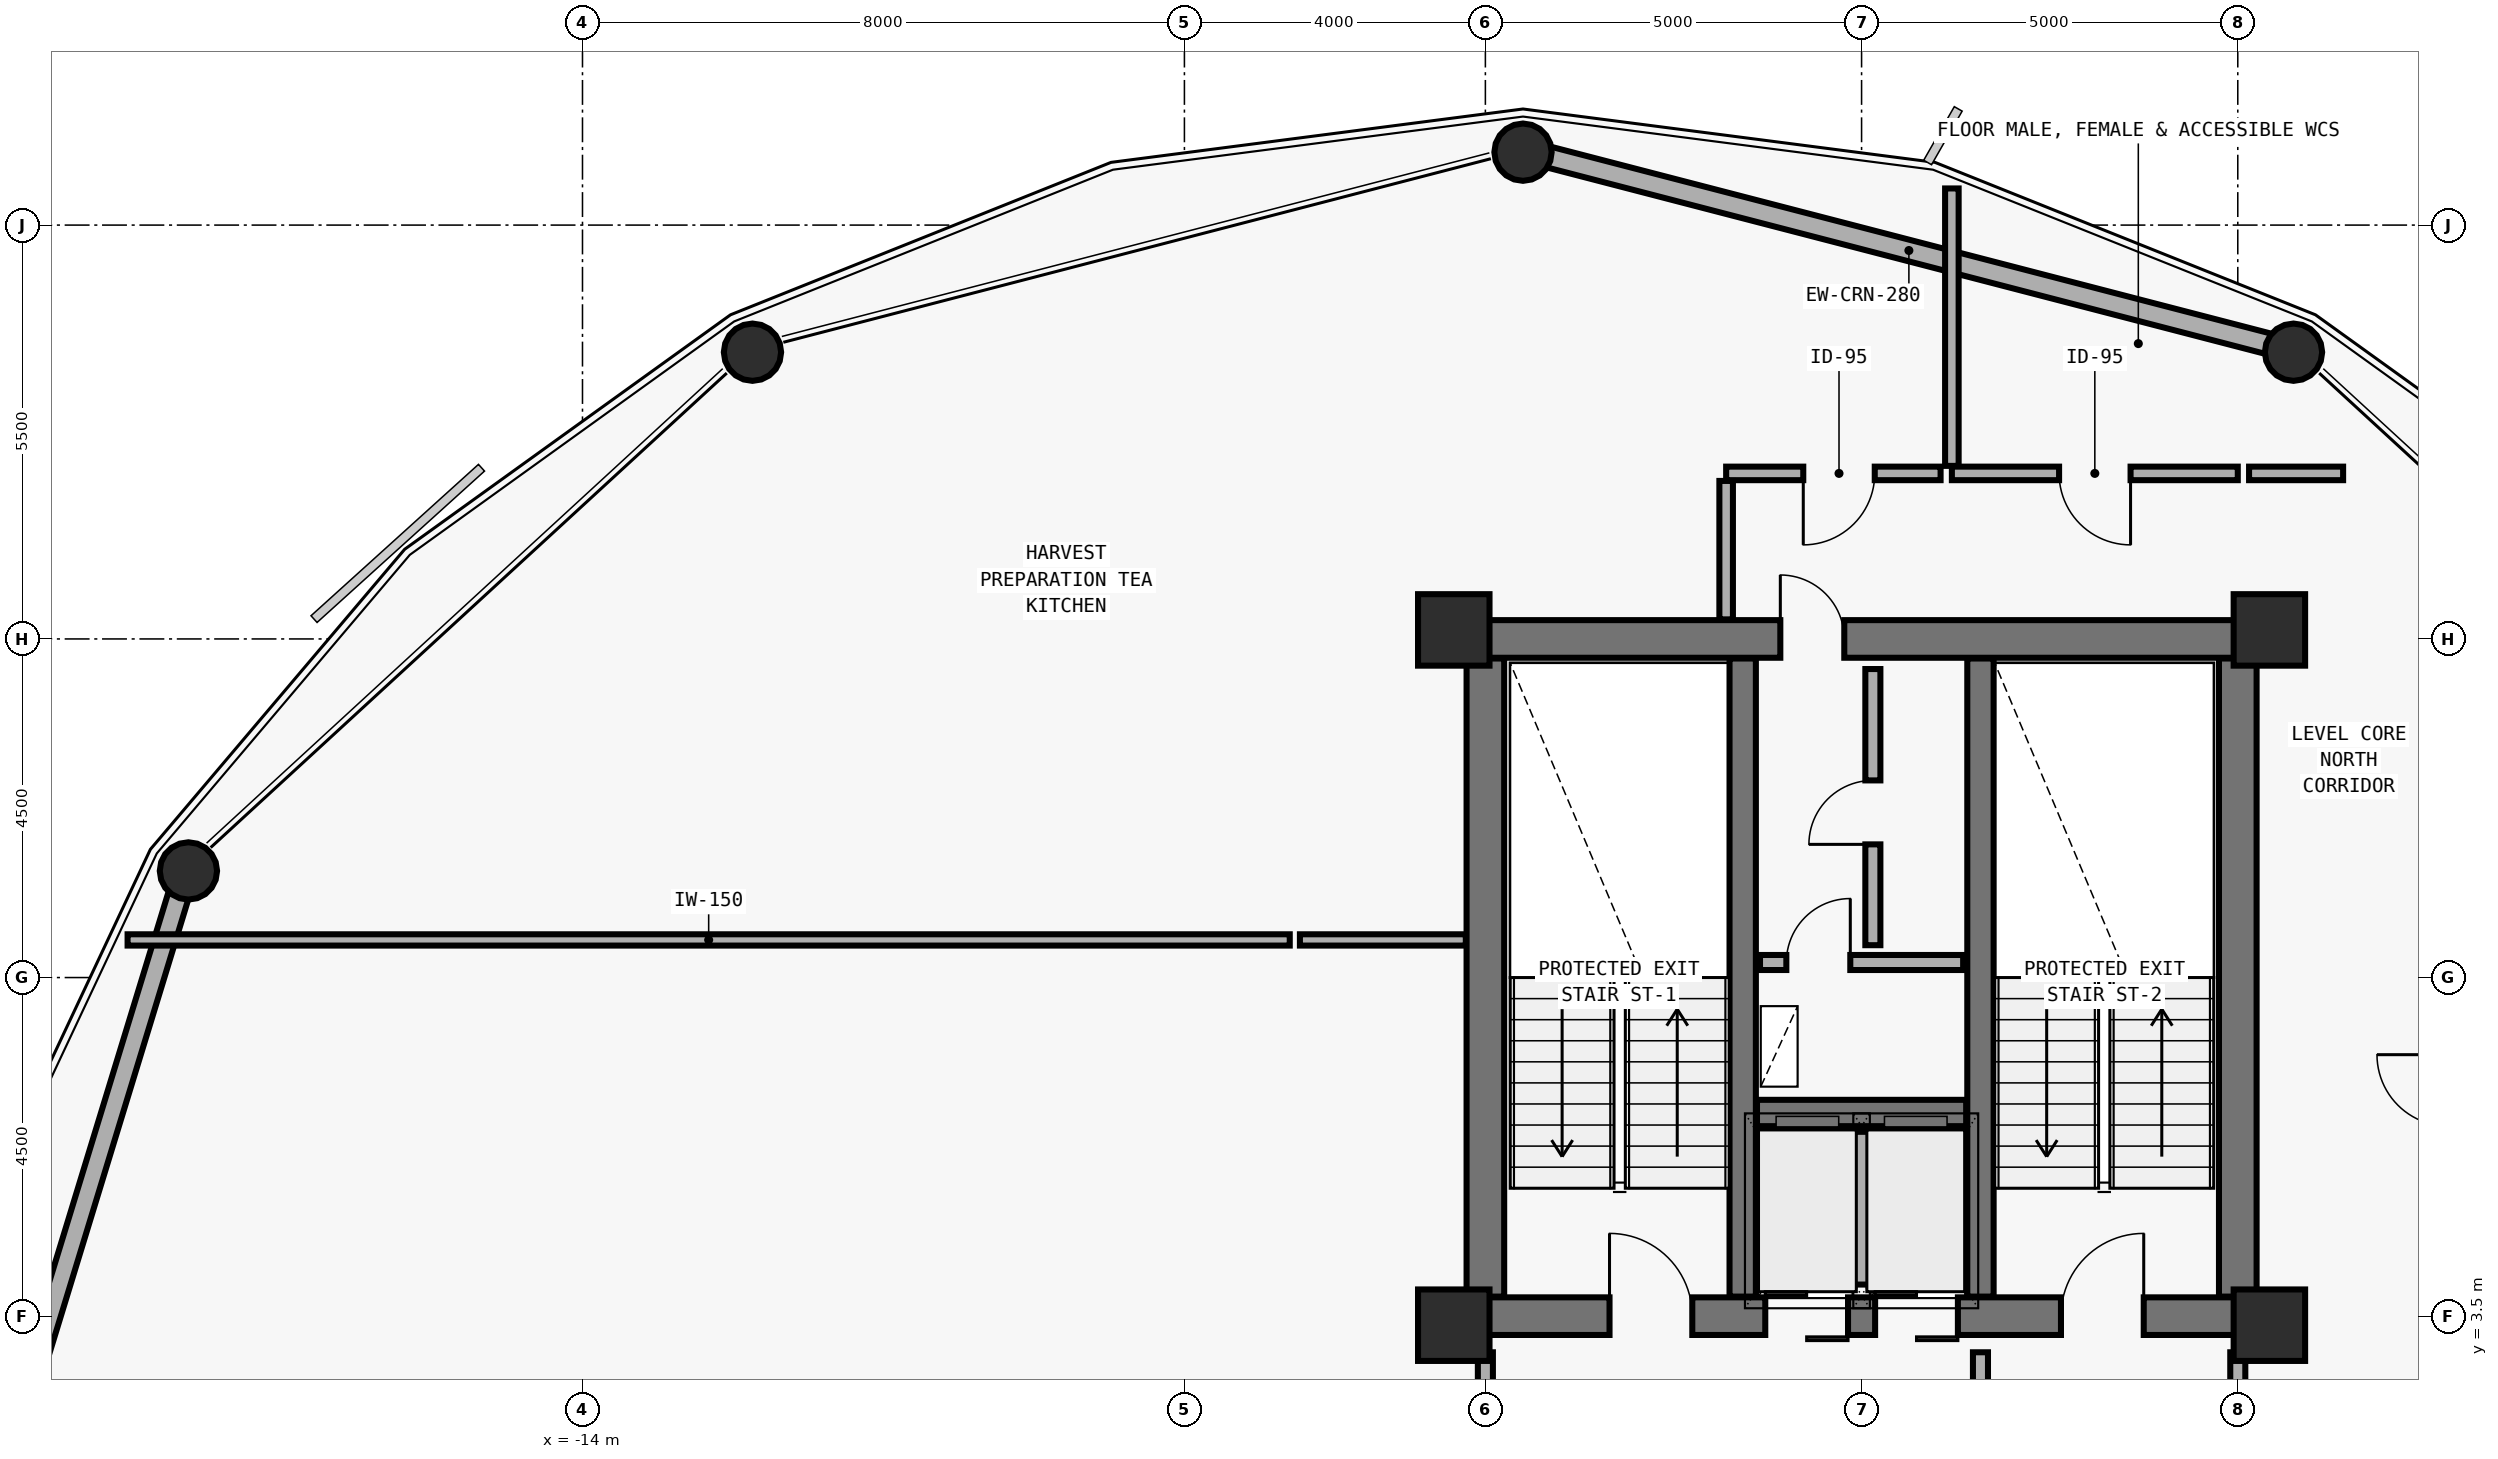
"""IFC4 building model, lengths in metres.
Left out: names, types, materials, properties, quantities, classifications, styles, units other than length and angle.
Written with IfcOpenShell. Run it as: python <this file> out.ifc"""

import sys

from ifc_helpers import new_model, si_unit, direction, frame, frame_2d, origin, origin_2d, place, context, subcontext, project, spatial, rectangle, hollow_circle, extrude, element, fill, save


model = new_model("IFC4")
c1 = context("Model", 3, precision=1e-05, world=origin(), true_north=direction((0.0, 1.0)))
c2 = subcontext(c1, "Body", "Model", "MODEL_VIEW")
j1 = project(units=[si_unit("LENGTHUNIT", "METRE"), si_unit("PLANEANGLEUNIT", "RADIAN")], contexts=[c1])
p1 = place(None, origin())
s1 = spatial("IfcSite", under=j1, at=p1, CompositionType="ELEMENT")
p2 = place(p1, origin())
s2 = spatial("IfcBuilding", under=s1, at=p2, CompositionType="ELEMENT")
p3 = place(p2, frame((0.0, 0.0, 157.8)))
s3 = spatial("IfcBuildingStorey", under=s2, at=p3, CompositionType="ELEMENT", Elevation=157.8)
p4 = place(p3, frame((-2.0, 3.5, 0.0), z_axis=(0.0, 0.0, 1.0), x_axis=(1.0, 0.0, 0.0)))
e1 = element("IfcWall", 1, at=p4, inside=s3, PredefinedType="SHEAR", context=c2, shape_type="SweptSolid", body=[
    extrude(rectangle(XDim=10.0, YDim=0.5, at=frame_2d((5.0, 0.0))), origin(), (0.0, 0.0, 1.0), 3.892),
])
p5 = place(p4, frame((1.65, 0.0, 0.0)))
e2 = element("IfcOpeningElement", 2, at=p5, cuts=e1, PredefinedType="OPENING", context=c2, shape_type="SweptSolid", body=[
    extrude(rectangle(XDim=1.1, YDim=2.15, at=frame_2d((0.55, 1.075))), frame((0.0, 0.26, 0.0), z_axis=(0.0, -1.0, 0.0), x_axis=(1.0, 0.0, 0.0)), (0.0, 0.0, 1.0), 0.52),
])
p6 = place(p4, frame((7.65, 0.0, 0.0)))
e3 = element("IfcOpeningElement", 3, at=p6, cuts=e1, PredefinedType="OPENING", context=c2, shape_type="SweptSolid", body=[
    extrude(rectangle(XDim=1.1, YDim=2.15, at=frame_2d((0.55, 1.075))), frame((0.0, 0.26, 0.0), z_axis=(0.0, -1.0, 0.0), x_axis=(1.0, 0.0, 0.0)), (0.0, 0.0, 1.0), 0.52),
])
p7 = place(p4, frame((3.72, 0.0, 0.0)))
e4 = element("IfcOpeningElement", 4, at=p7, cuts=e1, PredefinedType="OPENING", context=c2, shape_type="SweptSolid", body=[
    extrude(rectangle(XDim=1.1, YDim=2.2, at=frame_2d((0.55, 1.1))), frame((0.0, 0.26, 0.0), z_axis=(0.0, -1.0, 0.0), x_axis=(1.0, 0.0, 0.0)), (0.0, 0.0, 1.0), 0.52),
])
p8 = place(p4, frame((5.18, 0.0, 0.0)))
e5 = element("IfcOpeningElement", 5, at=p8, cuts=e1, PredefinedType="OPENING", context=c2, shape_type="SweptSolid", body=[
    extrude(rectangle(XDim=1.1, YDim=2.2, at=frame_2d((0.55, 1.1))), frame((0.0, 0.26, 0.0), z_axis=(0.0, -1.0, 0.0), x_axis=(1.0, 0.0, 0.0)), (0.0, 0.0, 1.0), 0.52),
])
p9 = place(p3, frame((-2.0, 12.5, 0.0), z_axis=(0.0, 0.0, 1.0), x_axis=(1.0, 0.0, 0.0)))
e6 = element("IfcWall", 6, at=p9, inside=s3, PredefinedType="SHEAR", context=c2, shape_type="SweptSolid", body=[
    extrude(rectangle(XDim=10.0, YDim=0.5, at=frame_2d((5.0, 0.0))), origin(), (0.0, 0.0, 1.0), 3.892),
])
p10 = place(p9, frame((3.92, 0.0, 0.0)))
e7 = element("IfcOpeningElement", 7, at=p10, cuts=e6, PredefinedType="OPENING", context=c2, shape_type="SweptSolid", body=[
    extrude(rectangle(XDim=0.85, YDim=2.1, at=frame_2d((0.425, 1.05))), frame((0.0, 0.26, 0.0), z_axis=(0.0, -1.0, 0.0), x_axis=(1.0, 0.0, 0.0)), (0.0, 0.0, 1.0), 0.52),
])
for number, where, z_axis, x_axis in (
    (8, (-2.0, 3.76, 0.0), (0.0, 0.0, 1.0), (0.0, 1.0, 0.0)),
    (9, (8.0, 3.76, 0.0), (0.0, 0.0, 1.0), (0.0, 1.0, 0.0)),
):
    element("IfcWall", number, at=place(p3, frame(where, z_axis=z_axis, x_axis=x_axis)), inside=s3, PredefinedType="SHEAR", context=c2, shape_type="SweptSolid", body=[
        extrude(rectangle(XDim=8.48, YDim=0.5, at=frame_2d((4.24, 0.0))), origin(), (0.0, 0.0, 1.0), 3.892),
    ])
for number, where, z_axis, x_axis in (
    (10, (1.42, 3.76, 0.0), (0.0, 0.0, 1.0), (0.0, 1.0, 0.0)),
    (11, (4.58, 3.76, 0.0), (0.0, 0.0, 1.0), (0.0, 1.0, 0.0)),
):
    element("IfcWall", number, at=place(p3, frame(where, z_axis=z_axis, x_axis=x_axis)), inside=s3, PredefinedType="SHEAR", context=c2, shape_type="SweptSolid", body=[
        extrude(rectangle(XDim=8.48, YDim=0.35, at=frame_2d((4.24, 0.0))), origin(), (0.0, 0.0, 1.0), 3.892),
    ])
p11 = place(p3, frame((1.61, 6.2, 0.0), z_axis=(0.0, 0.0, 1.0), x_axis=(1.0, 0.0, 0.0)))
e12 = element("IfcWall", 12, at=p11, inside=s3, PredefinedType="SHEAR", context=c2, shape_type="SweptSolid", body=[
    extrude(rectangle(XDim=2.78, YDim=0.35, at=frame_2d((1.39, 0.0))), origin(), (0.0, 0.0, 1.0), 3.892),
])
for number, where, z_axis, x_axis in (
    (13, (-2.42, 12.62, 0.0), (0.0, 0.0, 1.0), (1.0, 0.0, 0.0)),
    (14, (8.42, 12.62, 0.0), (0.0, 0.0, 1.0), (1.0, 0.0, 0.0)),
    (15, (-2.42, 3.38, 0.0), (0.0, 0.0, 1.0), (1.0, 0.0, 0.0)),
    (16, (8.42, 3.38, 0.0), (0.0, 0.0, 1.0), (1.0, 0.0, 0.0)),
):
    element("IfcColumn", number, at=place(p3, frame(where, z_axis=z_axis, x_axis=x_axis)), inside=s3, PredefinedType="COLUMN", context=c2, shape_type="SweptSolid", body=[
        extrude(rectangle(XDim=0.95, YDim=0.95, at=origin_2d()), origin(), (0.0, 0.0, 1.0), 3.875),
    ])
p12 = place(p3, frame((8.758, 16.332, 0.0), z_axis=(-0.008630730053, -0.010772663059, 0.999904725576), x_axis=(0.780423354579, -0.625251459517, 0.0)))
e17 = element("IfcColumn", 17, at=p12, inside=s3, PredefinedType="COLUMN", context=c2, shape_type="SweptSolid", body=[
    extrude(hollow_circle(Radius=0.381, WallThickness=0.028, at=origin_2d()), origin(), (0.0, 0.0, 1.0), 3.875),
])
p13 = place(p3, frame((-1.5, 18.993, 0.0), z_axis=(0.0, -0.012347848881, 0.999923762408), x_axis=(1.0, 0.0, 0.0)))
e18 = element("IfcColumn", 18, at=p13, inside=s3, PredefinedType="COLUMN", context=c2, shape_type="SweptSolid", body=[
    extrude(hollow_circle(Radius=0.381, WallThickness=0.028, at=origin_2d()), origin(), (0.0, 0.0, 1.0), 3.875),
])
for number, where, z_axis, x_axis in (
    (19, (-11.758, 16.332, 0.0), (0.009, -0.011, 1.0), (0.78, 0.625, 0.0)),
    (20, (-19.267, 9.429, 0.0), (0.015, -0.006, 1.0), (0.381, 0.925, 0.0)),
):
    element("IfcColumn", number, at=place(p3, frame(where, z_axis=z_axis, x_axis=x_axis)), inside=s3, PredefinedType="COLUMN", context=c2, shape_type="SweptSolid", body=[
        extrude(hollow_circle(Radius=0.381, WallThickness=0.028, at=origin_2d()), origin(), (0.0, 0.0, 1.0), 3.875),
    ])
p14 = place(p3, frame((-1.175, 18.909, 0.0), z_axis=(0.0, 0.0, 1.0), x_axis=(0.967949740491, -0.251143982374, 0.0)))
e21 = element("IfcWall", 21, at=p14, inside=s3, PredefinedType="SOLIDWALL", context=c2, shape_type="SweptSolid", body=[
    extrude(rectangle(XDim=9.925, YDim=0.28, at=frame_2d((4.963, 0.0))), origin(), (0.0, 0.0, 1.0), 3.16),
])
p15 = place(p3, frame((-22.052, 0.321, 0.0), z_axis=(0.0, 0.0, 1.0), x_axis=(0.292446025951, 0.956282030525, 0.0)))
e22 = element("IfcWall", 22, at=p15, inside=s3, PredefinedType="SOLIDWALL", context=c2, shape_type="SweptSolid", body=[
    extrude(rectangle(XDim=9.188, YDim=0.28, at=frame_2d((4.594, 0.0))), origin(), (0.0, 0.0, 1.0), 3.16),
])
p16 = place(p3, frame((3.0, 3.92, 0.0), z_axis=(0.0, 0.0, 1.0), x_axis=(0.0, 1.0, 0.0)))
e23 = element("IfcWall", 23, at=p16, inside=s3, PredefinedType="SOLIDWALL", context=c2, shape_type="SweptSolid", body=[
    extrude(rectangle(XDim=2.03, YDim=0.2, at=frame_2d((1.015, 0.0))), origin(), (0.0, 0.0, 1.0), 3.64),
])
p17 = place(p3, frame((1.65, 8.2, 0.0), z_axis=(0.0, 0.0, 1.0), x_axis=(1.0, 0.0, 0.0)))
e24 = element("IfcWall", 24, at=p17, inside=s3, PredefinedType="MOVABLE", context=c2, shape_type="SweptSolid", body=[
    extrude(rectangle(XDim=2.7, YDim=0.2, at=frame_2d((1.35, 0.0))), origin(), (0.0, 0.0, 1.0), 3.64),
])
p18 = place(p17, frame((0.35, 0.0, 0.0)))
e25 = element("IfcOpeningElement", 25, at=p18, cuts=e24, PredefinedType="OPENING", context=c2, shape_type="SweptSolid", body=[
    extrude(rectangle(XDim=0.85, YDim=2.1, at=frame_2d((0.425, 1.05))), frame((0.0, 0.11, 0.0), z_axis=(0.0, -1.0, 0.0), x_axis=(1.0, 0.0, 0.0)), (0.0, 0.0, 1.0), 0.22),
])
p19 = place(p3, frame((3.15, 8.43, 0.0), z_axis=(0.0, 0.0, 1.0), x_axis=(0.0, 1.0, 0.0)))
e26 = element("IfcWall", 26, at=p19, inside=s3, PredefinedType="MOVABLE", context=c2, shape_type="SweptSolid", body=[
    extrude(rectangle(XDim=3.67, YDim=0.2, at=frame_2d((1.835, 0.0))), origin(), (0.0, 0.0, 1.0), 3.64),
])
p20 = place(p19, frame((1.34, 0.0, 0.0)))
e27 = element("IfcOpeningElement", 27, at=p20, cuts=e26, PredefinedType="OPENING", context=c2, shape_type="SweptSolid", body=[
    extrude(rectangle(XDim=0.85, YDim=2.1, at=frame_2d((0.425, 1.05))), frame((0.0, 0.11, 0.0), z_axis=(0.0, -1.0, 0.0), x_axis=(1.0, 0.0, 0.0)), (0.0, 0.0, 1.0), 0.22),
])
p21 = place(p3, frame((4.58, 0.83, 0.0), z_axis=(0.0, 0.0, 1.0), x_axis=(0.0, 1.0, 0.0)))
e28 = element("IfcWall", 28, at=p21, inside=s3, PredefinedType="MOVABLE", context=c2, shape_type="SweptSolid", body=[
    extrude(rectangle(XDim=2.19, YDim=0.2, at=frame_2d((1.095, 0.0))), origin(), (0.0, 0.0, 1.0), 3.64),
])
p22 = place(p21, frame((0.66, 0.0, 0.0)))
e29 = element("IfcOpeningElement", 29, at=p22, cuts=e28, PredefinedType="OPENING", context=c2, shape_type="SweptSolid", body=[
    extrude(rectangle(XDim=1.0, YDim=2.1, at=frame_2d((0.5, 1.05))), frame((0.0, 0.11, 0.0), z_axis=(0.0, -1.0, 0.0), x_axis=(1.0, 0.0, 0.0)), (0.0, 0.0, 1.0), 0.22),
])
p23 = place(p3, frame((8.0, 0.72, 0.0), z_axis=(0.0, 0.0, 1.0), x_axis=(0.0, 1.0, 0.0)))
e30 = element("IfcWall", 30, at=p23, inside=s3, PredefinedType="MOVABLE", context=c2, shape_type="SweptSolid", body=[
    extrude(rectangle(XDim=2.3, YDim=0.2, at=frame_2d((1.15, 0.0))), origin(), (0.0, 0.0, 1.0), 2.872),
])
p24 = place(p23, frame((0.845, 0.0, 0.0)))
e31 = element("IfcOpeningElement", 31, at=p24, cuts=e30, PredefinedType="OPENING", context=c2, shape_type="SweptSolid", body=[
    extrude(rectangle(XDim=0.85, YDim=2.1, at=frame_2d((0.425, 1.05))), frame((0.0, 0.11, 0.0), z_axis=(0.0, -1.0, 0.0), x_axis=(1.0, 0.0, 0.0)), (0.0, 0.0, 1.0), 0.22),
])
p25 = place(p3, frame((8.0, 14.7, 0.0), z_axis=(0.0, 0.0, 1.0), x_axis=(-1.0, 0.0, 0.0)))
e32 = element("IfcWall", 32, at=p25, inside=s3, PredefinedType="PLUMBINGWALL", context=c2, shape_type="SweptSolid", body=[
    extrude(rectangle(XDim=3.8, YDim=0.18, at=frame_2d((1.9, 0.0))), origin(), (0.0, 0.0, 1.0), 3.222),
])
p26 = place(p25, frame((1.425, 0.0, 0.0)))
e33 = element("IfcOpeningElement", 33, at=p26, cuts=e32, PredefinedType="OPENING", context=c2, shape_type="SweptSolid", body=[
    extrude(rectangle(XDim=0.95, YDim=2.1, at=frame_2d((0.475, 1.05))), frame((0.0, 0.1, 0.0), z_axis=(0.0, -1.0, 0.0), x_axis=(1.0, 0.0, 0.0)), (0.0, 0.0, 1.0), 0.2),
])
p27 = place(p3, frame((4.05, 14.7, 0.0), z_axis=(0.0, 0.0, 1.0), x_axis=(-1.0, 0.0, 0.0)))
e34 = element("IfcWall", 34, at=p27, inside=s3, PredefinedType="PLUMBINGWALL", context=c2, shape_type="SweptSolid", body=[
    extrude(rectangle(XDim=2.85, YDim=0.18, at=frame_2d((1.425, 0.0))), origin(), (0.0, 0.0, 1.0), 3.222),
])
p28 = place(p27, frame((0.875, 0.0, 0.0)))
e35 = element("IfcOpeningElement", 35, at=p28, cuts=e34, PredefinedType="OPENING", context=c2, shape_type="SweptSolid", body=[
    extrude(rectangle(XDim=0.95, YDim=2.1, at=frame_2d((0.475, 1.05))), frame((0.0, 0.1, 0.0), z_axis=(0.0, -1.0, 0.0), x_axis=(1.0, 0.0, 0.0)), (0.0, 0.0, 1.0), 0.2),
])
p29 = place(p3, frame((-2.0, 0.72, 0.0), z_axis=(0.0, 0.0, 1.0), x_axis=(0.0, 1.0, 0.0)))
e36 = element("IfcWall", 36, at=p29, inside=s3, PredefinedType="MOVABLE", context=c2, shape_type="SweptSolid", body=[
    extrude(rectangle(XDim=2.3, YDim=0.2, at=frame_2d((1.15, 0.0))), origin(), (0.0, 0.0, 1.0), 2.872),
])
p30 = place(p3, frame((9.4, 14.7, 0.0), z_axis=(0.0, 0.0, 1.0), x_axis=(-1.0, 0.0, 0.0)))
e37 = element("IfcWall", 37, at=p30, inside=s3, PredefinedType="PLUMBINGWALL", context=c2, shape_type="SweptSolid", body=[
    extrude(rectangle(XDim=1.25, YDim=0.18, at=frame_2d((0.625, 0.0))), origin(), (0.0, 0.0, 1.0), 3.222),
])
p31 = place(p3, frame((-20.046, 8.5, 0.0), z_axis=(0.0, 0.0, 1.0), x_axis=(1.0, 0.0, 0.0)))
e38 = element("IfcWall", 38, at=p31, inside=s3, PredefinedType="PARTITIONING", context=c2, shape_type="SweptSolid", body=[
    extrude(rectangle(XDim=15.446, YDim=0.15, at=frame_2d((7.723, 0.0))), origin(), (0.0, 0.0, 1.0), 3.64),
])
p32 = place(p3, frame((-4.465, 8.5, 0.0), z_axis=(0.0, 0.0, 1.0), x_axis=(1.0, 0.0, 0.0)))
e39 = element("IfcWall", 39, at=p32, inside=s3, PredefinedType="PARTITIONING", context=c2, shape_type="SweptSolid", body=[
    extrude(rectangle(XDim=2.205, YDim=0.15, at=frame_2d((1.103, 0.0))), origin(), (0.0, 0.0, 1.0), 3.64),
])
p33 = place(p3, frame((1.2, 14.6, 0.0), z_axis=(0.0, 0.0, 1.0), x_axis=(0.0, -1.0, 0.0)))
e40 = element("IfcWall", 40, at=p33, inside=s3, PredefinedType="PLUMBINGWALL", context=c2, shape_type="SweptSolid", body=[
    extrude(rectangle(XDim=1.84, YDim=0.18, at=frame_2d((0.92, 0.0))), origin(), (0.0, 0.0, 1.0), 3.64),
])
p34 = place(p3, frame((4.2, 18.487, 0.0), z_axis=(0.0, 0.0, 1.0), x_axis=(0.0, -1.0, 0.0)))
e41 = element("IfcWall", 41, at=p34, inside=s3, PredefinedType="PLUMBINGWALL", context=c2, shape_type="SweptSolid", body=[
    extrude(rectangle(XDim=3.687, YDim=0.18, at=frame_2d((1.844, 0.0))), origin(), (0.0, 0.0, 1.0), 3.64),
])
p35 = place(p5, origin())
e42 = element("IfcDoor", 42, at=p35, inside=s3, OperationType="SINGLE_SWING_LEFT", PredefinedType="DOOR", context=c2, shape_type="SweptSolid", body=[
    extrude(rectangle(XDim=1.1, YDim=2.15, at=frame_2d((0.55, 1.075))), frame((0.0, 0.025, 0.0), z_axis=(0.0, -1.0, 0.0), x_axis=(1.0, 0.0, 0.0)), (0.0, 0.0, 1.0), 0.05),
])
fill(e2, e42)
p36 = place(p6, origin())
e43 = element("IfcDoor", 43, at=p36, inside=s3, OperationType="SINGLE_SWING_RIGHT", PredefinedType="DOOR", context=c2, shape_type="SweptSolid", body=[
    extrude(rectangle(XDim=1.1, YDim=2.15, at=frame_2d((0.55, 1.075))), frame((0.0, 0.025, 0.0), z_axis=(0.0, -1.0, 0.0), x_axis=(1.0, 0.0, 0.0)), (0.0, 0.0, 1.0), 0.05),
])
fill(e3, e43)
p37 = place(p7, origin())
e44 = element("IfcDoor", 44, at=p37, inside=s3, OperationType="DOUBLE_DOOR_SLIDING", PredefinedType="DOOR", context=c2, shape_type="SweptSolid", body=[
    extrude(rectangle(XDim=1.1, YDim=2.2, at=frame_2d((0.55, 1.1))), frame((0.0, 0.025, 0.0), z_axis=(0.0, -1.0, 0.0), x_axis=(1.0, 0.0, 0.0)), (0.0, 0.0, 1.0), 0.05),
])
fill(e4, e44)
p38 = place(p8, origin())
e45 = element("IfcDoor", 45, at=p38, inside=s3, OperationType="DOUBLE_DOOR_SLIDING", PredefinedType="DOOR", context=c2, shape_type="SweptSolid", body=[
    extrude(rectangle(XDim=1.1, YDim=2.2, at=frame_2d((0.55, 1.1))), frame((0.0, 0.025, 0.0), z_axis=(0.0, -1.0, 0.0), x_axis=(1.0, 0.0, 0.0)), (0.0, 0.0, 1.0), 0.05),
])
fill(e5, e45)
p39 = place(p10, origin())
e46 = element("IfcDoor", 46, at=p39, inside=s3, OperationType="SINGLE_SWING_LEFT", PredefinedType="DOOR", context=c2, shape_type="SweptSolid", body=[
    extrude(rectangle(XDim=0.85, YDim=2.1, at=frame_2d((0.425, 1.05))), frame((0.0, 0.025, 0.0), z_axis=(0.0, -1.0, 0.0), x_axis=(1.0, 0.0, 0.0)), (0.0, 0.0, 1.0), 0.05),
])
fill(e7, e46)
p40 = place(p18, origin())
e47 = element("IfcDoor", 47, at=p40, inside=s3, OperationType="SINGLE_SWING_RIGHT", PredefinedType="DOOR", context=c2, shape_type="SweptSolid", body=[
    extrude(rectangle(XDim=0.85, YDim=2.1, at=frame_2d((0.425, 1.05))), frame((0.0, 0.025, 0.0), z_axis=(0.0, -1.0, 0.0), x_axis=(1.0, 0.0, 0.0)), (0.0, 0.0, 1.0), 0.05),
])
fill(e25, e47)
p41 = place(p20, origin())
e48 = element("IfcDoor", 48, at=p41, inside=s3, OperationType="SINGLE_SWING_LEFT", PredefinedType="DOOR", context=c2, shape_type="SweptSolid", body=[
    extrude(rectangle(XDim=0.85, YDim=2.1, at=frame_2d((0.425, 1.05))), frame((0.0, 0.025, 0.0), z_axis=(0.0, -1.0, 0.0), x_axis=(1.0, 0.0, 0.0)), (0.0, 0.0, 1.0), 0.05),
])
fill(e27, e48)
p42 = place(p26, origin())
e49 = element("IfcDoor", 49, at=p42, inside=s3, OperationType="SINGLE_SWING_LEFT", PredefinedType="DOOR", context=c2, shape_type="SweptSolid", body=[
    extrude(rectangle(XDim=0.95, YDim=2.1, at=frame_2d((0.475, 1.05))), frame((0.0, 0.025, 0.0), z_axis=(0.0, -1.0, 0.0), x_axis=(1.0, 0.0, 0.0)), (0.0, 0.0, 1.0), 0.05),
])
fill(e33, e49)
p43 = place(p28, origin())
e50 = element("IfcDoor", 50, at=p43, inside=s3, OperationType="SINGLE_SWING_RIGHT", PredefinedType="DOOR", context=c2, shape_type="SweptSolid", body=[
    extrude(rectangle(XDim=0.95, YDim=2.1, at=frame_2d((0.475, 1.05))), frame((0.0, 0.025, 0.0), z_axis=(0.0, -1.0, 0.0), x_axis=(1.0, 0.0, 0.0)), (0.0, 0.0, 1.0), 0.05),
])
fill(e35, e50)
save(model, sys.argv[1])
